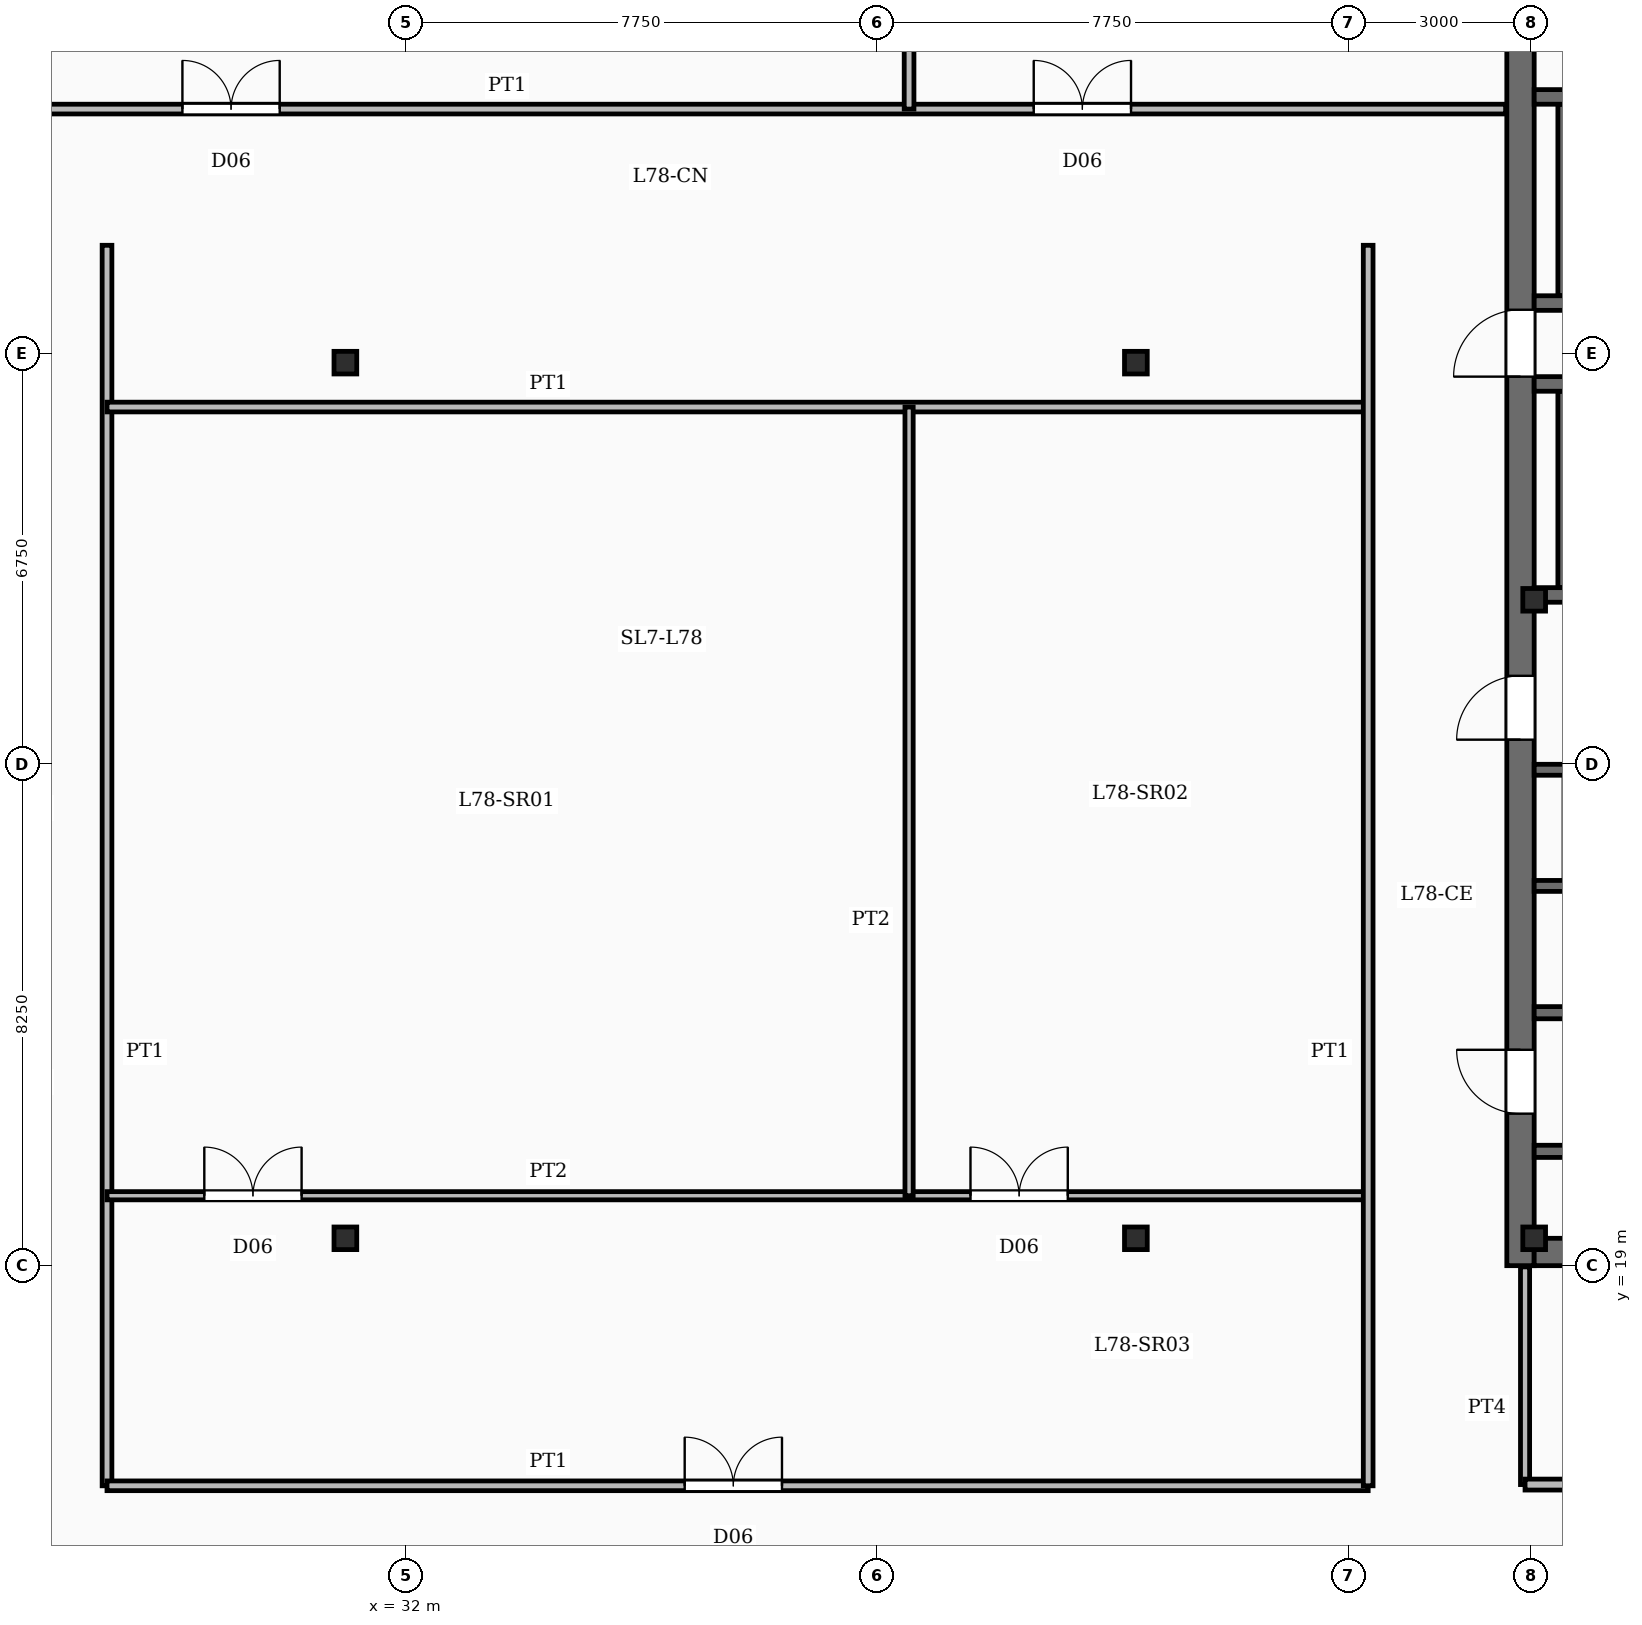
"""IFC4 building model, lengths in metres.
Left out: names, types, materials, properties, quantities, classifications, styles, units other than length and angle.
Written with IfcOpenShell. Run it as: python <this file> out.ifc"""

import sys

from ifc_helpers import new_model, si_unit, direction, frame, frame_2d, origin, origin_2d, place, context, subcontext, project, spatial, rectangle, i_section, extrude, element, fill, save


model = new_model("IFC4")
c1 = context("Model", 3, precision=1e-05, world=origin(), true_north=direction((0.0, 1.0)))
c2 = subcontext(c1, "Body", "Model", "MODEL_VIEW")
j1 = project(units=[si_unit("LENGTHUNIT", "METRE"), si_unit("PLANEANGLEUNIT", "RADIAN")], contexts=[c1])
p1 = place(None, origin())
s1 = spatial("IfcSite", under=j1, at=p1, CompositionType="ELEMENT")
p2 = place(p1, origin())
s2 = spatial("IfcBuilding", under=s1, at=p2, CompositionType="ELEMENT")
p3 = place(p2, frame((0.0, 0.0, 317.2)))
s3 = spatial("IfcBuildingStorey", under=s2, at=p3, CompositionType="ELEMENT", Elevation=317.2)
p4 = place(p3, frame((50.325, 19.0, -0.24), z_axis=(0.0, 0.0, 1.0), x_axis=(0.0, 1.0, 0.0)))
e1 = element("IfcWall", 1, at=p4, inside=s3, PredefinedType="SHEAR", context=c2, shape_type="SweptSolid", body=[
    extrude(rectangle(XDim=20.8, YDim=0.45, at=frame_2d((10.4, 0.0))), origin(), (0.0, 0.0, 1.0), 4.62),
])
p5 = place(p4, frame((2.5, 0.0, 0.24)))
e2 = element("IfcOpeningElement", 2, at=p5, cuts=e1, PredefinedType="OPENING", context=c2, shape_type="SweptSolid", body=[
    extrude(rectangle(XDim=1.05, YDim=2.15, at=frame_2d((0.525, 1.075))), frame((0.0, 0.235, 0.0), z_axis=(0.0, -1.0, 0.0), x_axis=(1.0, 0.0, 0.0)), (0.0, 0.0, 1.0), 0.47),
])
p6 = place(p4, frame((8.65, 0.0, 0.24)))
e3 = element("IfcOpeningElement", 3, at=p6, cuts=e1, PredefinedType="OPENING", context=c2, shape_type="SweptSolid", body=[
    extrude(rectangle(XDim=1.05, YDim=2.15, at=frame_2d((0.525, 1.075))), frame((0.0, 0.235, 0.0), z_axis=(0.0, -1.0, 0.0), x_axis=(1.0, 0.0, 0.0)), (0.0, 0.0, 1.0), 0.47),
])
p7 = place(p4, frame((14.62, 0.0, 0.24)))
e4 = element("IfcOpeningElement", 4, at=p7, cuts=e1, PredefinedType="OPENING", context=c2, shape_type="SweptSolid", body=[
    extrude(rectangle(XDim=1.1, YDim=2.15, at=frame_2d((0.55, 1.075))), frame((0.0, 0.235, 0.0), z_axis=(0.0, -1.0, 0.0), x_axis=(1.0, 0.0, 0.0)), (0.0, 0.0, 1.0), 0.47),
])
p8 = place(p3, frame((50.55, 19.225, -0.24), z_axis=(0.0, 0.0, 1.0), x_axis=(1.0, 0.0, 0.0)))
e5 = element("IfcWall", 5, at=p8, inside=s3, PredefinedType="SHEAR", context=c2, shape_type="SweptSolid", body=[
    extrude(rectangle(XDim=9.8, YDim=0.45, at=frame_2d((4.9, 0.0))), origin(), (0.0, 0.0, 1.0), 4.62),
])
for number, where, z_axis, x_axis in (
    (6, (50.55, 19.45, -0.24), (0.0, 0.0, 1.0), (1.0, 0.0, 0.0)),
    (7, (50.55, 29.95, -0.24), (0.0, 0.0, 1.0), (1.0, 0.0, 0.0)),
    (8, (31.0, 19.45, -0.24), (0.0, 0.0, 1.0), (1.0, 0.0, 0.0)),
    (9, (44.0, 19.45, -0.24), (0.0, 0.0, 1.0), (1.0, 0.0, 0.0)),
    (10, (31.0, 33.85, -0.24), (0.0, 0.0, 1.0), (1.0, 0.0, 0.0)),
    (11, (44.0, 33.85, -0.24), (0.0, 0.0, 1.0), (1.0, 0.0, 0.0)),
):
    element("IfcColumn", number, at=place(p3, frame(where, z_axis=z_axis, x_axis=x_axis)), inside=s3, PredefinedType="COLUMN", context=c2, shape_type="SweptSolid", body=[
        extrude(i_section(OverallWidth=0.374, OverallDepth=0.372, WebThickness=0.016, FlangeThickness=0.026, FilletRadius=0.02, at=origin_2d()), origin(), (0.0, 0.0, 1.0), 4.62),
    ])
p9 = place(p3, frame((60.35, 30.03, 0.0), z_axis=(0.0, 0.0, 1.0), x_axis=(-1.0, 0.0, 0.0)))
e12 = element("IfcWall", 12, at=p9, inside=s3, PredefinedType="SOLIDWALL", context=c2, shape_type="SweptSolid", body=[
    extrude(rectangle(XDim=9.8, YDim=0.24, at=frame_2d((4.9, 0.0))), origin(), (0.0, 0.0, 1.0), 4.38),
])
p10 = place(p9, frame((7.83, 0.0, 0.0)))
e13 = element("IfcOpeningElement", 13, at=p10, cuts=e12, PredefinedType="OPENING", context=c2, shape_type="SweptSolid", body=[
    extrude(rectangle(XDim=1.1, YDim=2.15, at=frame_2d((0.55, 1.075))), frame((0.0, 0.13, 0.0), z_axis=(0.0, -1.0, 0.0), x_axis=(1.0, 0.0, 0.0)), (0.0, 0.0, 1.0), 0.26),
])
p11 = place(p3, frame((50.55, 33.5, 0.0), z_axis=(0.0, 0.0, 1.0), x_axis=(1.0, 0.0, 0.0)))
e14 = element("IfcWall", 14, at=p11, inside=s3, PredefinedType="SOLIDWALL", context=c2, shape_type="SweptSolid", body=[
    extrude(rectangle(XDim=9.8, YDim=0.24, at=frame_2d((4.9, 0.0))), origin(), (0.0, 0.0, 1.0), 4.38),
])
p12 = place(p3, frame((51.06, 30.15, 0.0), z_axis=(0.0, 0.0, 1.0), x_axis=(0.0, 1.0, 0.0)))
e15 = element("IfcWall", 15, at=p12, inside=s3, PredefinedType="SOLIDWALL", context=c2, shape_type="SweptSolid", body=[
    extrude(rectangle(XDim=3.23, YDim=0.24, at=frame_2d((1.615, 0.0))), origin(), (0.0, 0.0, 1.0), 4.38),
])
p13 = place(p3, frame((60.35, 34.83, 0.0), z_axis=(0.0, 0.0, 1.0), x_axis=(-1.0, 0.0, 0.0)))
e16 = element("IfcWall", 16, at=p13, inside=s3, PredefinedType="SOLIDWALL", context=c2, shape_type="SweptSolid", body=[
    extrude(rectangle(XDim=9.8, YDim=0.24, at=frame_2d((4.9, 0.0))), origin(), (0.0, 0.0, 1.0), 4.38),
])
p14 = place(p13, frame((7.87, 0.0, 0.0)))
e17 = element("IfcOpeningElement", 17, at=p14, cuts=e16, PredefinedType="OPENING", context=c2, shape_type="SweptSolid", body=[
    extrude(rectangle(XDim=1.1, YDim=2.15, at=frame_2d((0.55, 1.075))), frame((0.0, 0.13, 0.0), z_axis=(0.0, -1.0, 0.0), x_axis=(1.0, 0.0, 0.0)), (0.0, 0.0, 1.0), 0.26),
])
p15 = place(p3, frame((50.55, 38.22, 0.0), z_axis=(0.0, 0.0, 1.0), x_axis=(1.0, 0.0, 0.0)))
e18 = element("IfcWall", 18, at=p15, inside=s3, PredefinedType="SOLIDWALL", context=c2, shape_type="SweptSolid", body=[
    extrude(rectangle(XDim=9.8, YDim=0.24, at=frame_2d((4.9, 0.0))), origin(), (0.0, 0.0, 1.0), 4.38),
])
p16 = place(p3, frame((51.06, 34.95, 0.0), z_axis=(0.0, 0.0, 1.0), x_axis=(0.0, 1.0, 0.0)))
e19 = element("IfcWall", 19, at=p16, inside=s3, PredefinedType="SOLIDWALL", context=c2, shape_type="SweptSolid", body=[
    extrude(rectangle(XDim=3.15, YDim=0.24, at=frame_2d((1.575, 0.0))), origin(), (0.0, 0.0, 1.0), 4.38),
])
p17 = place(p3, frame((50.55, 27.155, 0.0), z_axis=(0.0, 0.0, 1.0), x_axis=(1.0, 0.0, 0.0)))
e20 = element("IfcWall", 20, at=p17, inside=s3, PredefinedType="SOLIDWALL", context=c2, shape_type="SweptSolid", body=[
    extrude(rectangle(XDim=3.24, YDim=0.18, at=frame_2d((1.62, 0.0))), origin(), (0.0, 0.0, 1.0), 4.38),
])
p18 = place(p17, frame((1.235, 0.0, 0.0)))
e21 = element("IfcOpeningElement", 21, at=p18, cuts=e20, PredefinedType="OPENING", context=c2, shape_type="SweptSolid", body=[
    extrude(rectangle(XDim=1.35, YDim=2.3, at=frame_2d((0.675, 1.15))), frame((0.0, 0.1, 0.0), z_axis=(0.0, -1.0, 0.0), x_axis=(1.0, 0.0, 0.0)), (0.0, 0.0, 1.0), 0.2),
])
p19 = place(p3, frame((50.55, 25.245, 0.0), z_axis=(0.0, 0.0, 1.0), x_axis=(1.0, 0.0, 0.0)))
e22 = element("IfcWall", 22, at=p19, inside=s3, PredefinedType="SOLIDWALL", context=c2, shape_type="SweptSolid", body=[
    extrude(rectangle(XDim=3.24, YDim=0.18, at=frame_2d((1.62, 0.0))), origin(), (0.0, 0.0, 1.0), 4.38),
])
p20 = place(p3, frame((50.55, 20.88, 0.0), z_axis=(0.0, 0.0, 1.0), x_axis=(1.0, 0.0, 0.0)))
e23 = element("IfcWall", 23, at=p20, inside=s3, PredefinedType="SOLIDWALL", context=c2, shape_type="SweptSolid", body=[
    extrude(rectangle(XDim=9.8, YDim=0.2, at=frame_2d((4.9, 0.0))), origin(), (0.0, 0.0, 1.0), 3.44),
])
p21 = place(p20, frame((1.4, 0.0, 0.0)))
e24 = element("IfcOpeningElement", 24, at=p21, cuts=e23, PredefinedType="OPENING", context=c2, shape_type="SweptSolid", body=[
    extrude(rectangle(XDim=1.05, YDim=2.15, at=frame_2d((0.525, 1.075))), frame((0.0, 0.11, 0.0), z_axis=(0.0, -1.0, 0.0), x_axis=(1.0, 0.0, 0.0)), (0.0, 0.0, 1.0), 0.22),
])
p22 = place(p20, frame((5.5, 0.0, 0.0)))
e25 = element("IfcOpeningElement", 25, at=p22, cuts=e23, PredefinedType="OPENING", context=c2, shape_type="SweptSolid", body=[
    extrude(rectangle(XDim=1.05, YDim=2.15, at=frame_2d((0.525, 1.075))), frame((0.0, 0.11, 0.0), z_axis=(0.0, -1.0, 0.0), x_axis=(1.0, 0.0, 0.0)), (0.0, 0.0, 1.0), 0.22),
])
p23 = place(p3, frame((50.55, 23.16, 0.0), z_axis=(0.0, 0.0, 1.0), x_axis=(1.0, 0.0, 0.0)))
e26 = element("IfcWall", 26, at=p23, inside=s3, PredefinedType="SOLIDWALL", context=c2, shape_type="SweptSolid", body=[
    extrude(rectangle(XDim=3.33, YDim=0.2, at=frame_2d((1.665, 0.0))), origin(), (0.0, 0.0, 1.0), 3.44),
])
p24 = place(p23, frame((0.55, 0.0, 0.0)))
e27 = element("IfcOpeningElement", 27, at=p24, cuts=e26, PredefinedType="OPENING", context=c2, shape_type="SweptSolid", body=[
    extrude(rectangle(XDim=0.86, YDim=2.05, at=frame_2d((0.43, 1.025))), frame((0.0, 0.11, 0.0), z_axis=(0.0, -1.0, 0.0), x_axis=(1.0, 0.0, 0.0)), (0.0, 0.0, 1.0), 0.22),
])
p25 = place(p3, frame((50.4, 15.4, 0.0), z_axis=(0.0, 0.0, 1.0), x_axis=(1.0, 0.0, 0.0)))
e28 = element("IfcWall", 28, at=p25, inside=s3, PredefinedType="SOLIDWALL", context=c2, shape_type="SweptSolid", body=[
    extrude(rectangle(XDim=10.0, YDim=0.18, at=frame_2d((5.0, 0.0))), origin(), (0.0, 0.0, 1.0), 3.44),
])
p26 = place(p25, frame((1.19, 0.0, 0.0)))
e29 = element("IfcOpeningElement", 29, at=p26, cuts=e28, PredefinedType="OPENING", context=c2, shape_type="SweptSolid", body=[
    extrude(rectangle(XDim=0.92, YDim=2.1, at=frame_2d((0.46, 1.05))), frame((0.0, 0.1, 0.0), z_axis=(0.0, -1.0, 0.0), x_axis=(1.0, 0.0, 0.0)), (0.0, 0.0, 1.0), 0.2),
])
p27 = place(p25, frame((4.54, 0.0, 0.0)))
e30 = element("IfcOpeningElement", 30, at=p27, cuts=e28, PredefinedType="OPENING", context=c2, shape_type="SweptSolid", body=[
    extrude(rectangle(XDim=0.92, YDim=2.1, at=frame_2d((0.46, 1.05))), frame((0.0, 0.1, 0.0), z_axis=(0.0, -1.0, 0.0), x_axis=(1.0, 0.0, 0.0)), (0.0, 0.0, 1.0), 0.2),
])
p28 = place(p25, frame((7.92, 0.0, 0.0)))
e31 = element("IfcOpeningElement", 31, at=p28, cuts=e28, PredefinedType="OPENING", context=c2, shape_type="SweptSolid", body=[
    extrude(rectangle(XDim=0.86, YDim=2.05, at=frame_2d((0.43, 1.025))), frame((0.0, 0.1, 0.0), z_axis=(0.0, -1.0, 0.0), x_axis=(1.0, 0.0, 0.0)), (0.0, 0.0, 1.0), 0.2),
])
p29 = place(p3, frame((50.4, 15.4, 0.0), z_axis=(0.0, 0.0, 1.0), x_axis=(0.0, 1.0, 0.0)))
e32 = element("IfcWall", 32, at=p29, inside=s3, PredefinedType="PARTITIONING", context=c2, shape_type="SweptSolid", body=[
    extrude(rectangle(XDim=3.58, YDim=0.15, at=frame_2d((1.79, 0.0))), origin(), (0.0, 0.0, 1.0), 3.44),
])
p30 = place(p3, frame((27.08, 20.15, 0.0), z_axis=(0.0, 0.0, 1.0), x_axis=(1.0, 0.0, 0.0)))
e33 = element("IfcWall", 33, at=p30, inside=s3, PredefinedType="PARTITIONING", context=c2, shape_type="SweptSolid", body=[
    extrude(rectangle(XDim=20.74, YDim=0.135, at=frame_2d((10.37, 0.0))), origin(), (0.0, 0.0, 1.0), 3.44),
])
p31 = place(p30, frame((1.6, 0.0, 0.0)))
e34 = element("IfcOpeningElement", 34, at=p31, cuts=e33, PredefinedType="OPENING", context=c2, shape_type="SweptSolid", body=[
    extrude(rectangle(XDim=1.6, YDim=2.15, at=frame_2d((0.8, 1.075))), frame((0.0, 0.077, 0.0), z_axis=(0.0, -1.0, 0.0), x_axis=(1.0, 0.0, 0.0)), (0.0, 0.0, 1.0), 0.155),
])
p32 = place(p30, frame((14.2, 0.0, 0.0)))
e35 = element("IfcOpeningElement", 35, at=p32, cuts=e33, PredefinedType="OPENING", context=c2, shape_type="SweptSolid", body=[
    extrude(rectangle(XDim=1.6, YDim=2.15, at=frame_2d((0.8, 1.075))), frame((0.0, 0.077, 0.0), z_axis=(0.0, -1.0, 0.0), x_axis=(1.0, 0.0, 0.0)), (0.0, 0.0, 1.0), 0.155),
])
p33 = place(p3, frame((27.08, 33.12, 0.0), z_axis=(0.0, 0.0, 1.0), x_axis=(1.0, 0.0, 0.0)))
e36 = element("IfcWall", 36, at=p33, inside=s3, PredefinedType="PARTITIONING", context=c2, shape_type="SweptSolid", body=[
    extrude(rectangle(XDim=20.74, YDim=0.16, at=frame_2d((10.37, 0.0))), origin(), (0.0, 0.0, 1.0), 3.44),
])
p34 = place(p3, frame((40.27, 20.15, 0.0), z_axis=(0.0, 0.0, 1.0), x_axis=(0.0, 1.0, 0.0)))
e37 = element("IfcWall", 37, at=p34, inside=s3, PredefinedType="PARTITIONING", context=c2, shape_type="SweptSolid", body=[
    extrude(rectangle(XDim=12.97, YDim=0.135, at=frame_2d((6.485, 0.0))), origin(), (0.0, 0.0, 1.0), 3.44),
])
p35 = place(p3, frame((27.08, 15.38, 0.0), z_axis=(0.0, 0.0, 1.0), x_axis=(1.0, 0.0, 0.0)))
e38 = element("IfcWall", 38, at=p35, inside=s3, PredefinedType="PARTITIONING", context=c2, shape_type="SweptSolid", body=[
    extrude(rectangle(XDim=20.74, YDim=0.16, at=frame_2d((10.37, 0.0))), origin(), (0.0, 0.0, 1.0), 3.44),
])
p36 = place(p35, frame((9.5, 0.0, 0.0)))
e39 = element("IfcOpeningElement", 39, at=p36, cuts=e38, PredefinedType="OPENING", context=c2, shape_type="SweptSolid", body=[
    extrude(rectangle(XDim=1.6, YDim=2.15, at=frame_2d((0.8, 1.075))), frame((0.0, 0.09, 0.0), z_axis=(0.0, -1.0, 0.0), x_axis=(1.0, 0.0, 0.0)), (0.0, 0.0, 1.0), 0.18),
])
for number, where, z_axis, x_axis in (
    (40, (27.08, 15.38, 0.0), (0.0, 0.0, 1.0), (0.0, 1.0, 0.0)),
    (41, (47.82, 15.38, 0.0), (0.0, 0.0, 1.0), (0.0, 1.0, 0.0)),
):
    element("IfcWall", number, at=place(p3, frame(where, z_axis=z_axis, x_axis=x_axis)), inside=s3, PredefinedType="PARTITIONING", context=c2, shape_type="SweptSolid", body=[
        extrude(rectangle(XDim=20.4, YDim=0.16, at=frame_2d((10.2, 0.0))), origin(), (0.0, 0.0, 1.0), 3.44),
    ])
p37 = place(p3, frame((24.82, 38.02, 0.0), z_axis=(0.0, 0.0, 1.0), x_axis=(1.0, 0.0, 0.0)))
e42 = element("IfcWall", 42, at=p37, inside=s3, PredefinedType="PARTITIONING", context=c2, shape_type="SweptSolid", body=[
    extrude(rectangle(XDim=25.26, YDim=0.16, at=frame_2d((12.63, 0.0))), origin(), (0.0, 0.0, 1.0), 3.44),
])
p38 = place(p37, frame((3.5, 0.0, 0.0)))
e43 = element("IfcOpeningElement", 43, at=p38, cuts=e42, PredefinedType="OPENING", context=c2, shape_type="SweptSolid", body=[
    extrude(rectangle(XDim=1.6, YDim=2.15, at=frame_2d((0.8, 1.075))), frame((0.0, 0.09, 0.0), z_axis=(0.0, -1.0, 0.0), x_axis=(1.0, 0.0, 0.0)), (0.0, 0.0, 1.0), 0.18),
])
p39 = place(p37, frame((17.5, 0.0, 0.0)))
e44 = element("IfcOpeningElement", 44, at=p39, cuts=e42, PredefinedType="OPENING", context=c2, shape_type="SweptSolid", body=[
    extrude(rectangle(XDim=1.6, YDim=2.15, at=frame_2d((0.8, 1.075))), frame((0.0, 0.09, 0.0), z_axis=(0.0, -1.0, 0.0), x_axis=(1.0, 0.0, 0.0)), (0.0, 0.0, 1.0), 0.18),
])
p40 = place(p3, frame((40.27, 38.02, 0.0), z_axis=(0.0, 0.0, 1.0), x_axis=(0.0, 1.0, 0.0)))
e45 = element("IfcWall", 45, at=p40, inside=s3, PredefinedType="PARTITIONING", context=c2, shape_type="SweptSolid", body=[
    extrude(rectangle(XDim=13.866, YDim=0.16, at=frame_2d((6.933, 0.0))), origin(), (0.0, 0.0, 1.0), 3.44),
])
p41 = place(p5, origin())
e46 = element("IfcDoor", 46, at=p41, inside=s3, OperationType="SINGLE_SWING_RIGHT", PredefinedType="DOOR", context=c2, shape_type="SweptSolid", body=[
    extrude(rectangle(XDim=1.05, YDim=2.15, at=frame_2d((0.525, 1.075))), frame((0.0, 0.025, 0.0), z_axis=(0.0, -1.0, 0.0), x_axis=(1.0, 0.0, 0.0)), (0.0, 0.0, 1.0), 0.05),
])
fill(e2, e46)
p42 = place(p6, origin())
e47 = element("IfcDoor", 47, at=p42, inside=s3, OperationType="SINGLE_SWING_LEFT", PredefinedType="DOOR", context=c2, shape_type="SweptSolid", body=[
    extrude(rectangle(XDim=1.05, YDim=2.15, at=frame_2d((0.525, 1.075))), frame((0.0, 0.025, 0.0), z_axis=(0.0, -1.0, 0.0), x_axis=(1.0, 0.0, 0.0)), (0.0, 0.0, 1.0), 0.05),
])
fill(e3, e47)
p43 = place(p7, origin())
e48 = element("IfcDoor", 48, at=p43, inside=s3, OperationType="SINGLE_SWING_LEFT", PredefinedType="DOOR", context=c2, shape_type="SweptSolid", body=[
    extrude(rectangle(XDim=1.1, YDim=2.15, at=frame_2d((0.55, 1.075))), frame((0.0, 0.025, 0.0), z_axis=(0.0, -1.0, 0.0), x_axis=(1.0, 0.0, 0.0)), (0.0, 0.0, 1.0), 0.05),
])
fill(e4, e48)
p44 = place(p31, origin())
e49 = element("IfcDoor", 49, at=p44, inside=s3, OperationType="DOUBLE_DOOR_SINGLE_SWING", PredefinedType="DOOR", context=c2, shape_type="SweptSolid", body=[
    extrude(rectangle(XDim=1.6, YDim=2.15, at=frame_2d((0.8, 1.075))), frame((0.0, 0.025, 0.0), z_axis=(0.0, -1.0, 0.0), x_axis=(1.0, 0.0, 0.0)), (0.0, 0.0, 1.0), 0.05),
])
fill(e34, e49)
p45 = place(p32, origin())
e50 = element("IfcDoor", 50, at=p45, inside=s3, OperationType="DOUBLE_DOOR_SINGLE_SWING", PredefinedType="DOOR", context=c2, shape_type="SweptSolid", body=[
    extrude(rectangle(XDim=1.6, YDim=2.15, at=frame_2d((0.8, 1.075))), frame((0.0, 0.025, 0.0), z_axis=(0.0, -1.0, 0.0), x_axis=(1.0, 0.0, 0.0)), (0.0, 0.0, 1.0), 0.05),
])
fill(e35, e50)
p46 = place(p36, origin())
e51 = element("IfcDoor", 51, at=p46, inside=s3, OperationType="DOUBLE_DOOR_SINGLE_SWING", PredefinedType="DOOR", context=c2, shape_type="SweptSolid", body=[
    extrude(rectangle(XDim=1.6, YDim=2.15, at=frame_2d((0.8, 1.075))), frame((0.0, 0.025, 0.0), z_axis=(0.0, -1.0, 0.0), x_axis=(1.0, 0.0, 0.0)), (0.0, 0.0, 1.0), 0.05),
])
fill(e39, e51)
p47 = place(p38, origin())
e52 = element("IfcDoor", 52, at=p47, inside=s3, OperationType="DOUBLE_DOOR_SINGLE_SWING", PredefinedType="DOOR", context=c2, shape_type="SweptSolid", body=[
    extrude(rectangle(XDim=1.6, YDim=2.15, at=frame_2d((0.8, 1.075))), frame((0.0, 0.025, 0.0), z_axis=(0.0, -1.0, 0.0), x_axis=(1.0, 0.0, 0.0)), (0.0, 0.0, 1.0), 0.05),
])
fill(e43, e52)
p48 = place(p39, origin())
e53 = element("IfcDoor", 53, at=p48, inside=s3, OperationType="DOUBLE_DOOR_SINGLE_SWING", PredefinedType="DOOR", context=c2, shape_type="SweptSolid", body=[
    extrude(rectangle(XDim=1.6, YDim=2.15, at=frame_2d((0.8, 1.075))), frame((0.0, 0.025, 0.0), z_axis=(0.0, -1.0, 0.0), x_axis=(1.0, 0.0, 0.0)), (0.0, 0.0, 1.0), 0.05),
])
fill(e44, e53)
save(model, sys.argv[1])
